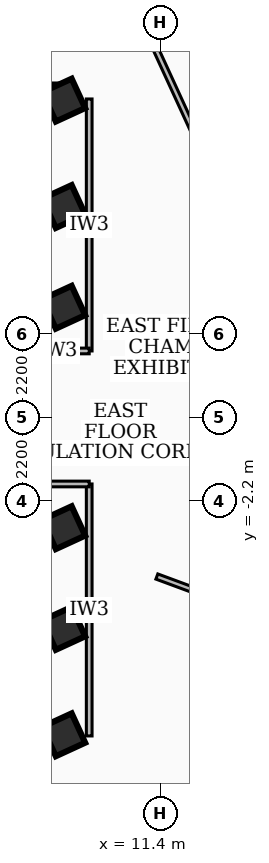
"""IFC4 building model, lengths in metres.
Left out: names, types, materials, properties, quantities, classifications, styles, units other than length and angle.
Written with IfcOpenShell. Run it as: python <this file> out.ifc"""

import sys

from ifc_helpers import new_model, si_unit, direction, frame, frame_2d, origin, origin_2d, place, context, subcontext, project, spatial, rectangle, extrude, element, save


model = new_model("IFC4")
c1 = context("Model", 3, precision=1e-05, world=origin(), true_north=direction((0.0, 1.0)))
c2 = subcontext(c1, "Body", "Model", "MODEL_VIEW")
j1 = project(units=[si_unit("LENGTHUNIT", "METRE"), si_unit("PLANEANGLEUNIT", "RADIAN")], contexts=[c1])
p1 = place(None, origin())
s1 = spatial("IfcSite", under=j1, at=p1, CompositionType="ELEMENT")
p2 = place(p1, origin())
s2 = spatial("IfcBuilding", under=s1, at=p2, CompositionType="ELEMENT")
p3 = place(p2, frame((0.0, 0.0, 184.68)))
s3 = spatial("IfcBuildingStorey", under=s2, at=p3, CompositionType="ELEMENT", Elevation=184.68)
for number, where, z_axis, x_axis in (
    (1, (-8.78, 8.535, 0.0), (0.0, 0.0, 1.0), (1.0, 0.0, 0.0)),
    (2, (8.78, -8.535, 0.0), (0.0, 0.0, 1.0), (-1.0, 0.0, 0.0)),
):
    element("IfcWall", number, at=place(p3, frame(where, z_axis=z_axis, x_axis=x_axis)), inside=s3, PredefinedType="SHEAR", context=c2, shape_type="SweptSolid", body=[
        extrude(rectangle(XDim=17.56, YDim=0.45, at=frame_2d((8.78, 0.0))), origin(), (0.0, 0.0, 1.0), 3.34),
    ])
for number, where, z_axis, x_axis in (
    (3, (8.85, -5.55, 0.0), (0.0, 0.0, 1.0), (0.909, 0.418, 0.0)),
    (4, (8.85, -2.9, 0.0), (0.0, 0.0, 1.0), (0.909, 0.418, 0.0)),
    (5, (8.85, 2.9, 0.0), (0.0, 0.0, 1.0), (0.909, 0.418, 0.0)),
    (6, (8.85, 5.55, 0.0), (0.0, 0.0, 1.0), (0.909, 0.418, 0.0)),
    (7, (8.85, -8.35, 0.0), (0.0, 0.0, 1.0), (0.909, 0.418, 0.0)),
    (8, (8.85, 8.35, 0.0), (0.0, 0.0, 1.0), (0.909, 0.418, 0.0)),
):
    element("IfcColumn", number, at=place(p3, frame(where, z_axis=z_axis, x_axis=x_axis)), inside=s3, PredefinedType="COLUMN", context=c2, shape_type="SweptSolid", body=[
        extrude(rectangle(XDim=0.85, YDim=0.85, at=origin_2d()), origin(), (0.0, 0.0, 1.0), 3.6),
    ])
p4 = place(p3, frame((17.806, -7.71, 0.0), z_axis=(0.0, 0.0, 1.0), x_axis=(-0.908646468859, -0.417566275734, 0.0)))
e9 = element("IfcWall", 9, at=p4, inside=s3, PredefinedType="SOLIDWALL", context=c2, shape_type="SweptSolid", body=[
    extrude(rectangle(XDim=6.758, YDim=0.22, at=frame_2d((3.379, 0.0))), origin(), (0.0, 0.0, 1.0), 3.34),
])
p5 = place(p3, frame((9.52, 1.75, 0.0), z_axis=(0.0, 0.0, 1.0), x_axis=(0.0, 1.0, 0.0)))
e10 = element("IfcWall", 10, at=p5, inside=s3, PredefinedType="PARTITIONING", context=c2, shape_type="SweptSolid", body=[
    extrude(rectangle(XDim=6.63, YDim=0.15, at=frame_2d((3.315, 0.0))), origin(), (0.0, 0.0, 1.0), 2.644),
])
p6 = place(p3, frame((7.85, 1.75, 0.0), z_axis=(0.0, 0.0, 1.0), x_axis=(1.0, 0.0, 0.0)))
e11 = element("IfcWall", 11, at=p6, inside=s3, PredefinedType="PARTITIONING", context=c2, shape_type="SweptSolid", body=[
    extrude(rectangle(XDim=1.67, YDim=0.15, at=frame_2d((0.835, 0.0))), origin(), (0.0, 0.0, 1.0), 2.57),
])
p7 = place(p3, frame((9.52, -8.38, 0.0), z_axis=(0.0, 0.0, 1.0), x_axis=(0.0, 1.0, 0.0)))
e12 = element("IfcWall", 12, at=p7, inside=s3, PredefinedType="PARTITIONING", context=c2, shape_type="SweptSolid", body=[
    extrude(rectangle(XDim=6.63, YDim=0.15, at=frame_2d((3.315, 0.0))), origin(), (0.0, 0.0, 1.0), 3.34),
])
p8 = place(p3, frame((7.85, -1.75, 0.0), z_axis=(0.0, 0.0, 1.0), x_axis=(1.0, 0.0, 0.0)))
e13 = element("IfcWall", 13, at=p8, inside=s3, PredefinedType="PARTITIONING", context=c2, shape_type="SweptSolid", body=[
    extrude(rectangle(XDim=1.67, YDim=0.15, at=frame_2d((0.835, 0.0))), origin(), (0.0, 0.0, 1.0), 2.57),
])
p9 = place(p3, frame((11.3, -4.185, 0.0), z_axis=(0.0, 0.0, 1.0), x_axis=(0.937797421925, -0.347182942311, 0.0)))
e14 = element("IfcWall", 14, at=p9, inside=s3, PredefinedType="PARTITIONING", context=c2, shape_type="SweptSolid", body=[
    extrude(rectangle(XDim=7.624, YDim=0.145, at=frame_2d((3.812, 0.0))), origin(), (0.0, 0.0, 1.0), 3.34),
])
p10 = place(p3, frame((8.6, 15.508, 0.0), z_axis=(0.0, 0.0, 1.0), x_axis=(0.41757132443, -0.908644148726, 0.0)))
e15 = element("IfcWall", 15, at=p10, inside=s3, PredefinedType="PARTITIONING", context=c2, shape_type="SweptSolid", body=[
    extrude(rectangle(XDim=20.521, YDim=0.145, at=frame_2d((10.26, 0.0))), origin(), (0.0, 0.0, 1.0), 2.644),
])
p11 = place(p10, frame((9.9, 0.0, 0.0)))
e16 = element("IfcOpeningElement", 16, at=p11, cuts=e15, PredefinedType="OPENING", context=c2, shape_type="SweptSolid", body=[
    extrude(rectangle(XDim=1.2, YDim=2.1, at=frame_2d((0.6, 1.05))), frame((0.0, 0.083, 0.0), z_axis=(0.0, -1.0, 0.0), x_axis=(1.0, 0.0, 0.0)), (0.0, 0.0, 1.0), 0.165),
])
p12 = place(p3, frame((15.508, -8.6, 0.0), z_axis=(0.0, 0.0, 1.0), x_axis=(-0.908644148726, -0.41757132443, 0.0)))
e17 = element("IfcWall", 17, at=p12, inside=s3, PredefinedType="PARTITIONING", context=c2, shape_type="SweptSolid", body=[
    extrude(rectangle(XDim=20.521, YDim=0.145, at=frame_2d((10.26, 0.0))), origin(), (0.0, 0.0, 1.0), 2.644),
])
p13 = place(p12, frame((9.9, 0.0, 0.0)))
e18 = element("IfcOpeningElement", 18, at=p13, cuts=e17, PredefinedType="OPENING", context=c2, shape_type="SweptSolid", body=[
    extrude(rectangle(XDim=1.2, YDim=2.1, at=frame_2d((0.6, 1.05))), frame((0.0, 0.083, 0.0), z_axis=(0.0, -1.0, 0.0), x_axis=(1.0, 0.0, 0.0)), (0.0, 0.0, 1.0), 0.165),
])
save(model, sys.argv[1])
